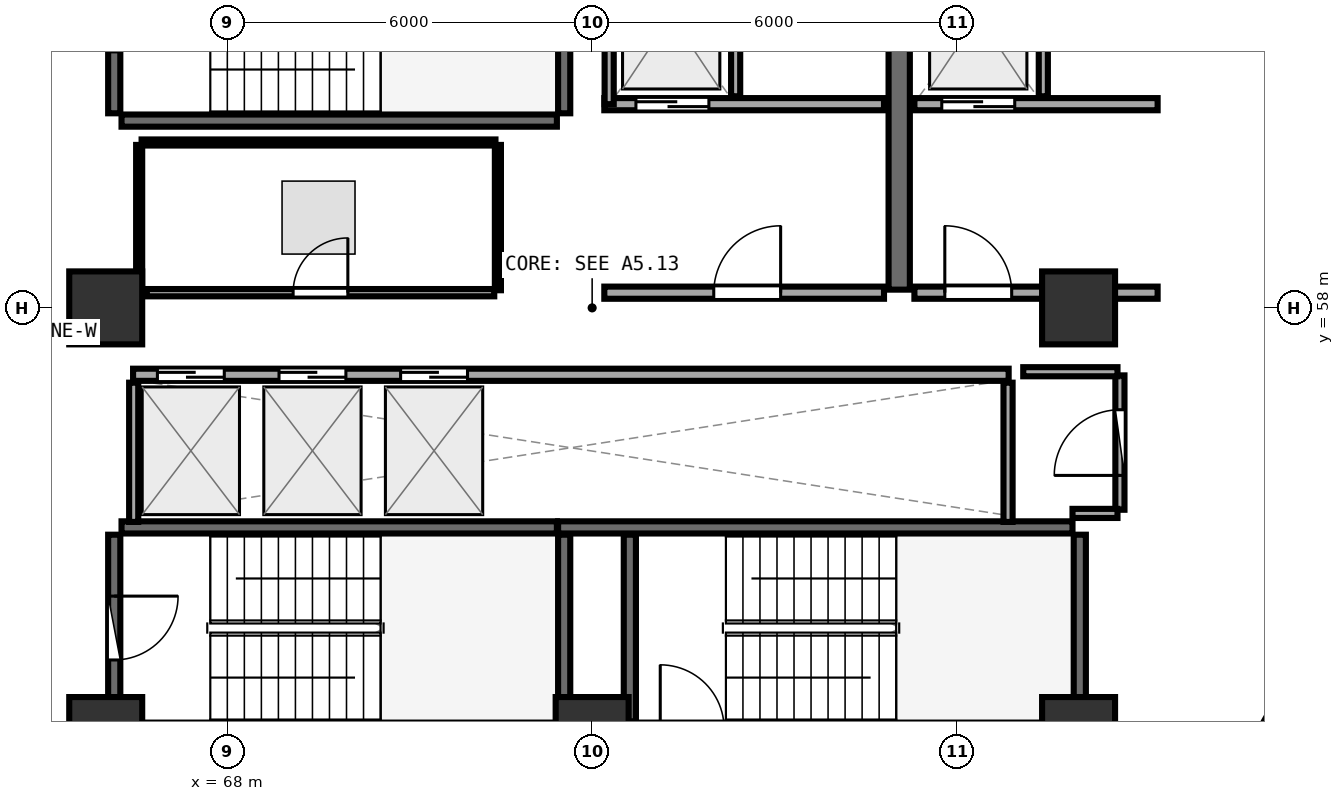
"""IFC4 building model, lengths in metres.
Left out: names, types, materials, properties, quantities, classifications, styles, units other than length and angle.
Written with IfcOpenShell. Run it as: python <this file> out.ifc"""

import sys

from ifc_helpers import new_model, si_unit, direction, frame, frame_2d, origin, origin_2d, place, context, subcontext, project, spatial, rectangle, extrude, element, fill, save


model = new_model("IFC4")
c1 = context("Model", 3, precision=1e-05, world=origin(), true_north=direction((0.0, 1.0)))
c2 = subcontext(c1, "Body", "Model", "MODEL_VIEW")
j1 = project(units=[si_unit("LENGTHUNIT", "METRE"), si_unit("PLANEANGLEUNIT", "RADIAN")], contexts=[c1])
p1 = place(None, origin())
s1 = spatial("IfcSite", under=j1, at=p1, CompositionType="ELEMENT")
p2 = place(p1, origin())
s2 = spatial("IfcBuilding", under=s1, at=p2, CompositionType="ELEMENT")
p3 = place(p2, frame((0.0, 0.0, 169.35)))
s3 = spatial("IfcBuildingStorey", under=s2, at=p3, CompositionType="ELEMENT", Elevation=169.35)
for number, where, z_axis, x_axis in (
    (1, (66.0, 51.0, 0.0), (0.0, 0.0, 1.0), (1.0, 0.0, 0.0)),
    (2, (74.0, 51.0, 0.0), (0.0, 0.0, 1.0), (1.0, 0.0, 0.0)),
    (3, (82.0, 51.0, 0.0), (0.0, 0.0, 1.0), (1.0, 0.0, 0.0)),
    (4, (82.0, 58.0, 0.0), (0.0, 0.0, 1.0), (1.0, 0.0, 0.0)),
    (5, (66.0, 58.0, 0.0), (0.0, 0.0, 1.0), (1.0, 0.0, 0.0)),
):
    element("IfcColumn", number, at=place(p3, frame(where, z_axis=z_axis, x_axis=x_axis)), inside=s3, PredefinedType="PILASTER", context=c2, shape_type="SweptSolid", body=[
        extrude(rectangle(XDim=1.2, YDim=1.2, at=origin_2d()), origin(), (0.0, 0.0, 1.0), 3.75),
    ])
p4 = place(p3, frame((66.26, 61.08, 0.0), z_axis=(0.0, 0.0, 1.0), x_axis=(1.0, 0.0, 0.0)))
e6 = element("IfcWall", 6, at=p4, inside=s3, PredefinedType="SHEAR", context=c2, shape_type="SweptSolid", body=[
    extrude(rectangle(XDim=7.16, YDim=0.2, at=frame_2d((3.58, 0.0))), origin(), (0.0, 0.0, 1.0), 3.49),
])
p5 = place(p3, frame((73.54, 61.2, 0.0), z_axis=(0.0, 0.0, 1.0), x_axis=(0.0, 1.0, 0.0)))
e7 = element("IfcWall", 7, at=p5, inside=s3, PredefinedType="SHEAR", context=c2, shape_type="SweptSolid", body=[
    extrude(rectangle(XDim=3.07, YDim=0.2, at=frame_2d((1.535, 0.0))), origin(), (0.0, 0.0, 1.0), 3.49),
])
p6 = place(p3, frame((66.14, 64.27, 0.0), z_axis=(0.0, 0.0, 1.0), x_axis=(0.0, -1.0, 0.0)))
e8 = element("IfcWall", 8, at=p6, inside=s3, PredefinedType="SHEAR", context=c2, shape_type="SweptSolid", body=[
    extrude(rectangle(XDim=3.07, YDim=0.2, at=frame_2d((1.535, 0.0))), origin(), (0.0, 0.0, 1.0), 3.49),
])
p7 = place(p6, frame((1.01, 0.0, 0.0)))
e9 = element("IfcOpeningElement", 9, at=p7, cuts=e8, PredefinedType="OPENING", context=c2, shape_type="SweptSolid", body=[
    extrude(rectangle(XDim=1.05, YDim=2.1, at=frame_2d((0.525, 1.05))), frame((0.0, 0.11, 0.0), z_axis=(0.0, -1.0, 0.0), x_axis=(1.0, 0.0, 0.0)), (0.0, 0.0, 1.0), 0.22),
])
p8 = place(p3, frame((82.02, 51.2, 0.0), z_axis=(0.0, 0.0, 1.0), x_axis=(0.0, 1.0, 0.0)))
e10 = element("IfcWall", 10, at=p8, inside=s3, PredefinedType="SHEAR", context=c2, shape_type="SweptSolid", body=[
    extrude(rectangle(XDim=3.07, YDim=0.2, at=frame_2d((1.535, 0.0))), origin(), (0.0, 0.0, 1.0), 3.49),
])
p9 = place(p3, frame((81.9, 54.39, 0.0), z_axis=(0.0, 0.0, 1.0), x_axis=(-1.0, 0.0, 0.0)))
e11 = element("IfcWall", 11, at=p9, inside=s3, PredefinedType="SHEAR", context=c2, shape_type="SweptSolid", body=[
    extrude(rectangle(XDim=8.46, YDim=0.2, at=frame_2d((4.23, 0.0))), origin(), (0.0, 0.0, 1.0), 3.49),
])
for number, where, z_axis, x_axis in (
    (12, (74.62, 54.27, 0.0), (0.0, 0.0, 1.0), (0.0, -1.0, 0.0)),
    (13, (73.54, 51.2, 0.0), (0.0, 0.0, 1.0), (0.0, 1.0, 0.0)),
):
    element("IfcWall", number, at=place(p3, frame(where, z_axis=z_axis, x_axis=x_axis)), inside=s3, PredefinedType="SHEAR", context=c2, shape_type="SweptSolid", body=[
        extrude(rectangle(XDim=3.07, YDim=0.2, at=frame_2d((1.535, 0.0))), origin(), (0.0, 0.0, 1.0), 3.49),
    ])
p10 = place(p3, frame((73.42, 54.39, 0.0), z_axis=(0.0, 0.0, 1.0), x_axis=(-1.0, 0.0, 0.0)))
e14 = element("IfcWall", 14, at=p10, inside=s3, PredefinedType="SHEAR", context=c2, shape_type="SweptSolid", body=[
    extrude(rectangle(XDim=7.16, YDim=0.2, at=frame_2d((3.58, 0.0))), origin(), (0.0, 0.0, 1.0), 3.49),
])
p11 = place(p3, frame((66.14, 54.27, 0.0), z_axis=(0.0, 0.0, 1.0), x_axis=(0.0, -1.0, 0.0)))
e15 = element("IfcWall", 15, at=p11, inside=s3, PredefinedType="SHEAR", context=c2, shape_type="SweptSolid", body=[
    extrude(rectangle(XDim=3.07, YDim=0.2, at=frame_2d((1.535, 0.0))), origin(), (0.0, 0.0, 1.0), 3.49),
])
p12 = place(p11, frame((1.01, 0.0, 0.0)))
e16 = element("IfcOpeningElement", 16, at=p12, cuts=e15, PredefinedType="OPENING", context=c2, shape_type="SweptSolid", body=[
    extrude(rectangle(XDim=1.05, YDim=2.1, at=frame_2d((0.525, 1.05))), frame((0.0, 0.11, 0.0), z_axis=(0.0, -1.0, 0.0), x_axis=(1.0, 0.0, 0.0)), (0.0, 0.0, 1.0), 0.22),
])
p13 = place(p3, frame((79.05, 58.3, 0.0), z_axis=(0.0, 0.0, 1.0), x_axis=(0.0, 1.0, 0.0)))
e17 = element("IfcWall", 17, at=p13, inside=s3, PredefinedType="SHEAR", context=c2, shape_type="SweptSolid", body=[
    extrude(rectangle(XDim=6.3, YDim=0.35, at=frame_2d((3.15, 0.0))), origin(), (0.0, 0.0, 1.0), 3.49),
])
p14 = place(p3, frame((74.2, 61.35, 0.0), z_axis=(0.0, 0.0, 1.0), x_axis=(1.0, 0.0, 0.0)))
e18 = element("IfcWall", 18, at=p14, inside=s3, PredefinedType="SOLIDWALL", context=c2, shape_type="SweptSolid", body=[
    extrude(rectangle(XDim=4.6, YDim=0.2, at=frame_2d((2.3, 0.0))), origin(), (0.0, 0.0, 1.0), 3.48),
])
p15 = place(p14, frame((0.52, 0.0, 0.0)))
e19 = element("IfcOpeningElement", 19, at=p15, cuts=e18, PredefinedType="OPENING", context=c2, shape_type="SweptSolid", body=[
    extrude(rectangle(XDim=1.2, YDim=2.15, at=frame_2d((0.6, 1.075))), frame((0.0, 0.11, 0.0), z_axis=(0.0, -1.0, 0.0), x_axis=(1.0, 0.0, 0.0)), (0.0, 0.0, 1.0), 0.22),
])
p16 = place(p3, frame((74.28, 61.35, 0.0), z_axis=(0.0, 0.0, 1.0), x_axis=(0.0, 1.0, 0.0)))
e20 = element("IfcWall", 20, at=p16, inside=s3, PredefinedType="PARTITIONING", context=c2, shape_type="SweptSolid", body=[
    extrude(rectangle(XDim=2.97, YDim=0.15, at=frame_2d((1.485, 0.0))), origin(), (0.0, 0.0, 1.0), 3.48),
])
p17 = place(p3, frame((76.36, 61.48, 0.0), z_axis=(0.0, 0.0, 1.0), x_axis=(0.0, 1.0, 0.0)))
e21 = element("IfcWall", 21, at=p17, inside=s3, PredefinedType="PARTITIONING", context=c2, shape_type="SweptSolid", body=[
    extrude(rectangle(XDim=2.84, YDim=0.15, at=frame_2d((1.42, 0.0))), origin(), (0.0, 0.0, 1.0), 3.48),
])
p18 = place(p3, frame((79.3, 61.35, 0.0), z_axis=(0.0, 0.0, 1.0), x_axis=(1.0, 0.0, 0.0)))
e22 = element("IfcWall", 22, at=p18, inside=s3, PredefinedType="SOLIDWALL", context=c2, shape_type="SweptSolid", body=[
    extrude(rectangle(XDim=4.0, YDim=0.2, at=frame_2d((2.0, 0.0))), origin(), (0.0, 0.0, 1.0), 2.775),
])
p19 = place(p18, frame((0.45, 0.0, 0.0)))
e23 = element("IfcOpeningElement", 23, at=p19, cuts=e22, PredefinedType="OPENING", context=c2, shape_type="SweptSolid", body=[
    extrude(rectangle(XDim=1.2, YDim=2.15, at=frame_2d((0.6, 1.075))), frame((0.0, 0.11, 0.0), z_axis=(0.0, -1.0, 0.0), x_axis=(1.0, 0.0, 0.0)), (0.0, 0.0, 1.0), 0.22),
])
p20 = place(p3, frame((81.42, 61.48, 0.0), z_axis=(0.0, 0.0, 1.0), x_axis=(0.0, 1.0, 0.0)))
e24 = element("IfcWall", 24, at=p20, inside=s3, PredefinedType="PARTITIONING", context=c2, shape_type="SweptSolid", body=[
    extrude(rectangle(XDim=2.84, YDim=0.15, at=frame_2d((1.42, 0.0))), origin(), (0.0, 0.0, 1.0), 3.48),
])
p21 = place(p3, frame((74.2, 58.25, 0.0), z_axis=(0.0, 0.0, 1.0), x_axis=(1.0, 0.0, 0.0)))
e25 = element("IfcWall", 25, at=p21, inside=s3, PredefinedType="SOLIDWALL", context=c2, shape_type="SweptSolid", body=[
    extrude(rectangle(XDim=4.6, YDim=0.2, at=frame_2d((2.3, 0.0))), origin(), (0.0, 0.0, 1.0), 3.48),
])
p22 = place(p21, frame((1.8, 0.0, 0.0)))
e26 = element("IfcOpeningElement", 26, at=p22, cuts=e25, PredefinedType="OPENING", context=c2, shape_type="SweptSolid", body=[
    extrude(rectangle(XDim=1.1, YDim=2.1, at=frame_2d((0.55, 1.05))), frame((0.0, 0.11, 0.0), z_axis=(0.0, -1.0, 0.0), x_axis=(1.0, 0.0, 0.0)), (0.0, 0.0, 1.0), 0.22),
])
p23 = place(p3, frame((79.3, 58.25, 0.0), z_axis=(0.0, 0.0, 1.0), x_axis=(1.0, 0.0, 0.0)))
e27 = element("IfcWall", 27, at=p23, inside=s3, PredefinedType="SOLIDWALL", context=c2, shape_type="SweptSolid", body=[
    extrude(rectangle(XDim=4.0, YDim=0.2, at=frame_2d((2.0, 0.0))), origin(), (0.0, 0.0, 1.0), 2.775),
])
p24 = place(p23, frame((0.5, 0.0, 0.0)))
e28 = element("IfcOpeningElement", 28, at=p24, cuts=e27, PredefinedType="OPENING", context=c2, shape_type="SweptSolid", body=[
    extrude(rectangle(XDim=1.1, YDim=2.1, at=frame_2d((0.55, 1.05))), frame((0.0, 0.11, 0.0), z_axis=(0.0, -1.0, 0.0), x_axis=(1.0, 0.0, 0.0)), (0.0, 0.0, 1.0), 0.22),
])
p25 = place(p3, frame((66.45, 56.9, 0.0), z_axis=(0.0, 0.0, 1.0), x_axis=(1.0, 0.0, 0.0)))
e29 = element("IfcWall", 29, at=p25, inside=s3, PredefinedType="SOLIDWALL", context=c2, shape_type="SweptSolid", body=[
    extrude(rectangle(XDim=14.4, YDim=0.2, at=frame_2d((7.2, 0.0))), origin(), (0.0, 0.0, 1.0), 3.48),
])
p26 = place(p25, frame((0.4, 0.0, 0.0)))
e30 = element("IfcOpeningElement", 30, at=p26, cuts=e29, PredefinedType="OPENING", context=c2, shape_type="SweptSolid", body=[
    extrude(rectangle(XDim=1.1, YDim=2.1, at=frame_2d((0.55, 1.05))), frame((0.0, 0.11, 0.0), z_axis=(0.0, -1.0, 0.0), x_axis=(1.0, 0.0, 0.0)), (0.0, 0.0, 1.0), 0.22),
])
p27 = place(p25, frame((2.4, 0.0, 0.0)))
e31 = element("IfcOpeningElement", 31, at=p27, cuts=e29, PredefinedType="OPENING", context=c2, shape_type="SweptSolid", body=[
    extrude(rectangle(XDim=1.1, YDim=2.1, at=frame_2d((0.55, 1.05))), frame((0.0, 0.11, 0.0), z_axis=(0.0, -1.0, 0.0), x_axis=(1.0, 0.0, 0.0)), (0.0, 0.0, 1.0), 0.22),
])
p28 = place(p25, frame((4.4, 0.0, 0.0)))
e32 = element("IfcOpeningElement", 32, at=p28, cuts=e29, PredefinedType="OPENING", context=c2, shape_type="SweptSolid", body=[
    extrude(rectangle(XDim=1.1, YDim=2.1, at=frame_2d((0.55, 1.05))), frame((0.0, 0.11, 0.0), z_axis=(0.0, -1.0, 0.0), x_axis=(1.0, 0.0, 0.0)), (0.0, 0.0, 1.0), 0.22),
])
for number, where, z_axis, x_axis in (
    (33, (66.46, 54.48, 0.0), (0.0, 0.0, 1.0), (0.0, 1.0, 0.0)),
    (34, (80.84, 54.48, 0.0), (0.0, 0.0, 1.0), (0.0, 1.0, 0.0)),
):
    element("IfcWall", number, at=place(p3, frame(where, z_axis=z_axis, x_axis=x_axis)), inside=s3, PredefinedType="PARTITIONING", context=c2, shape_type="SweptSolid", body=[
        extrude(rectangle(XDim=2.29, YDim=0.15, at=frame_2d((1.145, 0.0))), origin(), (0.0, 0.0, 1.0), 3.48),
    ])
p29 = place(p3, frame((82.68, 54.68, 0.0), z_axis=(0.0, 0.0, 1.0), x_axis=(0.0, 1.0, 0.0)))
e35 = element("IfcWall", 35, at=p29, inside=s3, PredefinedType="PARTITIONING", context=c2, shape_type="SweptSolid", body=[
    extrude(rectangle(XDim=2.21, YDim=0.15, at=frame_2d((1.105, 0.0))), origin(), (0.0, 0.0, 1.0), 3.48),
])
p30 = place(p29, frame((0.565, 0.0, 0.0)))
e36 = element("IfcOpeningElement", 36, at=p30, cuts=e35, PredefinedType="OPENING", context=c2, shape_type="SweptSolid", body=[
    extrude(rectangle(XDim=1.08, YDim=2.1, at=frame_2d((0.54, 1.05))), frame((0.0, 0.085, 0.0), z_axis=(0.0, -1.0, 0.0), x_axis=(1.0, 0.0, 0.0)), (0.0, 0.0, 1.0), 0.17),
])
p31 = place(p3, frame((66.675, 58.25, 0.0), z_axis=(0.0, 0.0, 1.0), x_axis=(1.0, 0.0, 0.0)))
e37 = element("IfcWall", 37, at=p31, inside=s3, PredefinedType="PARTITIONING", context=c2, shape_type="SweptSolid", body=[
    extrude(rectangle(XDim=5.715, YDim=0.12, at=frame_2d((2.857, 0.0))), origin(), (0.0, 0.0, 1.0), 3.48),
])
p32 = place(p31, frame((2.407, 0.0, 0.0)))
e38 = element("IfcOpeningElement", 38, at=p32, cuts=e37, PredefinedType="OPENING", context=c2, shape_type="SweptSolid", body=[
    extrude(rectangle(XDim=0.9, YDim=2.08, at=frame_2d((0.45, 1.04))), frame((0.0, 0.07, 0.0), z_axis=(0.0, -1.0, 0.0), x_axis=(1.0, 0.0, 0.0)), (0.0, 0.0, 1.0), 0.14),
])
p33 = place(p3, frame((81.9, 54.62, 0.0), z_axis=(0.0, 0.0, 1.0), x_axis=(1.0, 0.0, 0.0)))
e39 = element("IfcWall", 39, at=p33, inside=s3, PredefinedType="PARTITIONING", context=c2, shape_type="SweptSolid", body=[
    extrude(rectangle(XDim=0.74, YDim=0.15, at=frame_2d((0.37, 0.0))), origin(), (0.0, 0.0, 1.0), 2.775),
])
p34 = place(p3, frame((82.64, 56.95, 0.0), z_axis=(0.0, 0.0, 1.0), x_axis=(-1.0, 0.0, 0.0)))
e40 = element("IfcWall", 40, at=p34, inside=s3, PredefinedType="PARTITIONING", context=c2, shape_type="SweptSolid", body=[
    extrude(rectangle(XDim=1.55, YDim=0.15, at=frame_2d((0.775, 0.0))), origin(), (0.0, 0.0, 1.0), 2.775),
])
p35 = place(p3, frame((72.45, 58.29, 0.0), z_axis=(0.0, 0.0, 1.0), x_axis=(0.0, 1.0, 0.0)))
e41 = element("IfcWall", 41, at=p35, inside=s3, PredefinedType="PARTITIONING", context=c2, shape_type="SweptSolid", body=[
    extrude(rectangle(XDim=2.39, YDim=0.1, at=frame_2d((1.195, 0.0))), origin(), (0.0, 0.0, 1.0), 3.48),
])
p36 = place(p3, frame((72.41, 60.72, 0.0), z_axis=(0.0, 0.0, 1.0), x_axis=(-1.0, 0.0, 0.0)))
e42 = element("IfcWall", 42, at=p36, inside=s3, PredefinedType="PARTITIONING", context=c2, shape_type="SweptSolid", body=[
    extrude(rectangle(XDim=5.82, YDim=0.1, at=frame_2d((2.91, 0.0))), origin(), (0.0, 0.0, 1.0), 3.48),
])
p37 = place(p3, frame((66.55, 60.68, 0.0), z_axis=(0.0, 0.0, 1.0), x_axis=(0.0, -1.0, 0.0)))
e43 = element("IfcWall", 43, at=p37, inside=s3, PredefinedType="PARTITIONING", context=c2, shape_type="SweptSolid", body=[
    extrude(rectangle(XDim=2.383, YDim=0.1, at=frame_2d((1.191, 0.0))), origin(), (0.0, 0.0, 1.0), 3.48),
])
p38 = place(p3, frame((84.225, 49.645, 0.0), z_axis=(0.0, 0.0, 1.0), x_axis=(0.492113440037, 0.870531080511, 0.0)))
e44 = element("IfcWall", 44, at=p38, inside=s3, PredefinedType="PARTITIONING", context=c2, shape_type="SweptSolid", body=[
    extrude(rectangle(XDim=6.73, YDim=0.1, at=frame_2d((3.365, 0.0))), origin(), (0.0, 0.0, 1.0), 2.975),
])
p39 = place(p12, origin())
e45 = element("IfcDoor", 45, at=p39, inside=s3, OperationType="SINGLE_SWING_LEFT", PredefinedType="DOOR", context=c2, shape_type="SweptSolid", body=[
    extrude(rectangle(XDim=1.05, YDim=2.1, at=frame_2d((0.525, 1.05))), frame((0.0, 0.025, 0.0), z_axis=(0.0, -1.0, 0.0), x_axis=(1.0, 0.0, 0.0)), (0.0, 0.0, 1.0), 0.05),
])
fill(e16, e45)
p40 = place(p15, origin())
e46 = element("IfcDoor", 46, at=p40, inside=s3, OperationType="DOUBLE_DOOR_SLIDING", PredefinedType="DOOR", context=c2, shape_type="SweptSolid", body=[
    extrude(rectangle(XDim=1.2, YDim=2.15, at=frame_2d((0.6, 1.075))), frame((0.0, 0.025, 0.0), z_axis=(0.0, -1.0, 0.0), x_axis=(1.0, 0.0, 0.0)), (0.0, 0.0, 1.0), 0.05),
])
fill(e19, e46)
p41 = place(p19, origin())
e47 = element("IfcDoor", 47, at=p41, inside=s3, OperationType="DOUBLE_DOOR_SLIDING", PredefinedType="DOOR", context=c2, shape_type="SweptSolid", body=[
    extrude(rectangle(XDim=1.2, YDim=2.15, at=frame_2d((0.6, 1.075))), frame((0.0, 0.025, 0.0), z_axis=(0.0, -1.0, 0.0), x_axis=(1.0, 0.0, 0.0)), (0.0, 0.0, 1.0), 0.05),
])
fill(e23, e47)
p42 = place(p22, frame((1.1, 0.0, 0.0), z_axis=(0.0, 0.0, 1.0), x_axis=(-1.0, 0.0, 0.0)))
e48 = element("IfcDoor", 48, at=p42, inside=s3, OperationType="SINGLE_SWING_LEFT", PredefinedType="DOOR", context=c2, shape_type="SweptSolid", body=[
    extrude(rectangle(XDim=1.1, YDim=2.1, at=frame_2d((0.55, 1.05))), frame((0.0, 0.025, 0.0), z_axis=(0.0, -1.0, 0.0), x_axis=(1.0, 0.0, 0.0)), (0.0, 0.0, 1.0), 0.05),
])
fill(e26, e48)
p43 = place(p24, frame((1.1, 0.0, 0.0), z_axis=(0.0, 0.0, 1.0), x_axis=(-1.0, 0.0, 0.0)))
e49 = element("IfcDoor", 49, at=p43, inside=s3, OperationType="SINGLE_SWING_RIGHT", PredefinedType="DOOR", context=c2, shape_type="SweptSolid", body=[
    extrude(rectangle(XDim=1.1, YDim=2.1, at=frame_2d((0.55, 1.05))), frame((0.0, 0.025, 0.0), z_axis=(0.0, -1.0, 0.0), x_axis=(1.0, 0.0, 0.0)), (0.0, 0.0, 1.0), 0.05),
])
fill(e28, e49)
p44 = place(p26, origin())
e50 = element("IfcDoor", 50, at=p44, inside=s3, OperationType="DOUBLE_DOOR_SLIDING", PredefinedType="DOOR", context=c2, shape_type="SweptSolid", body=[
    extrude(rectangle(XDim=1.1, YDim=2.1, at=frame_2d((0.55, 1.05))), frame((0.0, 0.025, 0.0), z_axis=(0.0, -1.0, 0.0), x_axis=(1.0, 0.0, 0.0)), (0.0, 0.0, 1.0), 0.05),
])
fill(e30, e50)
p45 = place(p27, origin())
e51 = element("IfcDoor", 51, at=p45, inside=s3, OperationType="DOUBLE_DOOR_SLIDING", PredefinedType="DOOR", context=c2, shape_type="SweptSolid", body=[
    extrude(rectangle(XDim=1.1, YDim=2.1, at=frame_2d((0.55, 1.05))), frame((0.0, 0.025, 0.0), z_axis=(0.0, -1.0, 0.0), x_axis=(1.0, 0.0, 0.0)), (0.0, 0.0, 1.0), 0.05),
])
fill(e31, e51)
p46 = place(p28, origin())
e52 = element("IfcDoor", 52, at=p46, inside=s3, OperationType="DOUBLE_DOOR_SLIDING", PredefinedType="DOOR", context=c2, shape_type="SweptSolid", body=[
    extrude(rectangle(XDim=1.1, YDim=2.1, at=frame_2d((0.55, 1.05))), frame((0.0, 0.025, 0.0), z_axis=(0.0, -1.0, 0.0), x_axis=(1.0, 0.0, 0.0)), (0.0, 0.0, 1.0), 0.05),
])
fill(e32, e52)
p47 = place(p30, origin())
e53 = element("IfcDoor", 53, at=p47, inside=s3, OperationType="SINGLE_SWING_LEFT", PredefinedType="DOOR", context=c2, shape_type="SweptSolid", body=[
    extrude(rectangle(XDim=1.08, YDim=2.1, at=frame_2d((0.54, 1.05))), frame((0.0, 0.025, 0.0), z_axis=(0.0, -1.0, 0.0), x_axis=(1.0, 0.0, 0.0)), (0.0, 0.0, 1.0), 0.05),
])
fill(e36, e53)
p48 = place(p32, origin())
e54 = element("IfcDoor", 54, at=p48, inside=s3, OperationType="SINGLE_SWING_RIGHT", PredefinedType="DOOR", context=c2, shape_type="SweptSolid", body=[
    extrude(rectangle(XDim=0.9, YDim=2.08, at=frame_2d((0.45, 1.04))), frame((0.0, 0.025, 0.0), z_axis=(0.0, -1.0, 0.0), x_axis=(1.0, 0.0, 0.0)), (0.0, 0.0, 1.0), 0.05),
])
fill(e38, e54)
save(model, sys.argv[1])
